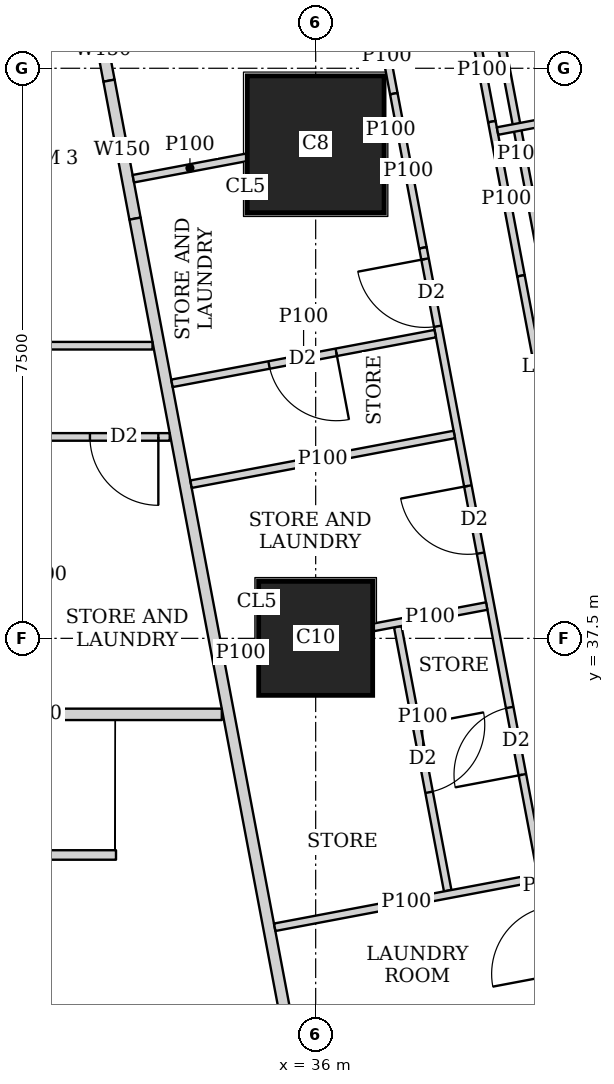
"""IFC4 building model, lengths in metres.
Left out: names, types, materials, properties, quantities, classifications, styles, units other than length and angle.
Written with IfcOpenShell. Run it as: python <this file> out.ifc"""

import sys

from ifc_helpers import new_model, si_unit, direction, frame, frame_2d, origin, origin_2d, place, context, subcontext, project, spatial, rectangle, extrude, element, fill, save


model = new_model("IFC4")
c1 = context("Model", 3, precision=1e-05, world=origin(), true_north=direction((0.0, 1.0)))
c2 = subcontext(c1, "Body", "Model", "MODEL_VIEW")
j1 = project(units=[si_unit("LENGTHUNIT", "METRE"), si_unit("PLANEANGLEUNIT", "RADIAN")], contexts=[c1])
p1 = place(None, origin())
s1 = spatial("IfcSite", under=j1, at=p1, CompositionType="ELEMENT")
p2 = place(p1, origin())
s2 = spatial("IfcBuilding", under=s1, at=p2, CompositionType="ELEMENT")
p3 = place(p2, frame((0.0, 0.0, 135.8)))
s3 = spatial("IfcBuildingStorey", under=s2, at=p3, CompositionType="ELEMENT", Elevation=135.8)
p4 = place(p3, frame((36.0, 37.5, 0.0), z_axis=(0.0, 0.0, 1.0), x_axis=(1.0, 0.0, 0.0)))
e1 = element("IfcColumn", 1, at=p4, inside=s3, PredefinedType="COLUMN", context=c2, shape_type="SweptSolid", body=[
    extrude(rectangle(XDim=1.5, YDim=1.5, at=origin_2d()), origin(), (0.0, 0.0, 1.0), 3.75),
])
p5 = place(p3, frame((36.0, 44.0, 0.0), z_axis=(0.0, 0.0, 1.0), x_axis=(1.0, 0.0, 0.0)))
e2 = element("IfcColumn", 2, at=p5, inside=s3, PredefinedType="COLUMN", context=c2, shape_type="SweptSolid", body=[
    extrude(rectangle(XDim=1.8, YDim=1.8, at=origin_2d()), origin(), (0.0, 0.0, 1.0), 3.75),
])
p6 = place(p3, frame((29.801, 36.5, 0.0), z_axis=(0.0, 0.0, 1.0), x_axis=(1.0, 0.0, 0.0)))
e3 = element("IfcWall", 3, at=p6, inside=s3, PredefinedType="SOLIDWALL", context=c2, shape_type="SweptSolid", body=[
    extrude(rectangle(XDim=4.964, YDim=0.15, at=frame_2d((2.482, 0.0))), origin(), (0.0, 0.0, 1.0), 3.5),
])
p7 = place(p3, frame((33.127, 45.65, 0.0), z_axis=(0.0, 0.0, 1.0), x_axis=(0.186176514576, -0.982516313056, 0.0)))
e4 = element("IfcWall", 4, at=p7, inside=s3, PredefinedType="SOLIDWALL", context=c2, shape_type="SweptSolid", body=[
    extrude(rectangle(XDim=0.827, YDim=0.15, at=frame_2d((0.414, 0.0))), origin(), (0.0, 0.0, 1.0), 3.5),
])
p8 = place(p3, frame((33.281, 44.837, 0.0), z_axis=(0.0, 0.0, 1.0), x_axis=(0.185198323004, -0.982701165745, 0.0)))
e5 = element("IfcWall", 5, at=p8, inside=s3, PredefinedType="SOLIDWALL", context=c2, shape_type="SweptSolid", body=[
    extrude(rectangle(XDim=1.847, YDim=0.15, at=frame_2d((0.923, 0.0))), origin(), (0.0, 0.0, 1.0), 2.1),
])
p9 = place(p3, frame((33.623, 43.022, 0.0), z_axis=(0.0, 0.0, 1.0), x_axis=(0.185596841028, -0.98262597798, 0.0)))
e6 = element("IfcWall", 6, at=p9, inside=s3, PredefinedType="SOLIDWALL", context=c2, shape_type="SweptSolid", body=[
    extrude(rectangle(XDim=41.66, YDim=0.15, at=frame_2d((20.83, 0.0))), origin(), (0.0, 0.0, 1.0), 2.5),
])
p10 = place(p9, frame((20.242, 0.0, 0.0)))
e7 = element("IfcOpeningElement", 7, at=p10, cuts=e6, PredefinedType="OPENING", context=c2, shape_type="SweptSolid", body=[
    extrude(rectangle(XDim=1.0, YDim=2.1, at=frame_2d((0.5, 1.05))), frame((0.0, 0.085, 0.0), z_axis=(0.0, -1.0, 0.0), x_axis=(1.0, 0.0, 0.0)), (0.0, 0.0, 1.0), 0.17),
])
p11 = place(p9, frame((24.714, 0.0, 0.0)))
e8 = element("IfcOpeningElement", 8, at=p11, cuts=e6, PredefinedType="OPENING", context=c2, shape_type="SweptSolid", body=[
    extrude(rectangle(XDim=1.0, YDim=2.1, at=frame_2d((0.5, 1.05))), frame((0.0, 0.085, 0.0), z_axis=(0.0, -1.0, 0.0), x_axis=(1.0, 0.0, 0.0)), (0.0, 0.0, 1.0), 0.17),
])
p12 = place(p9, frame((31.206, 0.0, 0.0)))
e9 = element("IfcOpeningElement", 9, at=p12, cuts=e6, PredefinedType="OPENING", context=c2, shape_type="SweptSolid", body=[
    extrude(rectangle(XDim=1.0, YDim=2.1, at=frame_2d((0.5, 1.05))), frame((0.0, 0.085, 0.0), z_axis=(0.0, -1.0, 0.0), x_axis=(1.0, 0.0, 0.0)), (0.0, 0.0, 1.0), 0.17),
])
p13 = place(p3, frame((39.054, 42.085, 0.0), z_axis=(0.0, 0.0, 1.0), x_axis=(-0.185791584218, 0.982589175207, 0.0)))
e10 = element("IfcWall", 10, at=p13, inside=s3, PredefinedType="PARTITIONING", context=c2, shape_type="SweptSolid", body=[
    extrude(rectangle(XDim=3.628, YDim=0.1, at=frame_2d((1.814, 0.0))), origin(), (0.0, 0.0, 1.0), 2.1),
])
p14 = place(p3, frame((38.063, 45.65, 0.0), z_axis=(0.0, 0.0, 1.0), x_axis=(0.185456359766, -0.982652501458, 0.0)))
e11 = element("IfcWall", 11, at=p14, inside=s3, PredefinedType="PARTITIONING", context=c2, shape_type="SweptSolid", body=[
    extrude(rectangle(XDim=1.376, YDim=0.1, at=frame_2d((0.688, 0.0))), origin(), (0.0, 0.0, 1.0), 3.5),
])
p15 = place(p3, frame((38.318, 44.298, 0.0), z_axis=(0.0, 0.0, 1.0), x_axis=(0.185481135188, -0.982647825261, 0.0)))
e12 = element("IfcWall", 12, at=p15, inside=s3, PredefinedType="PARTITIONING", context=c2, shape_type="SweptSolid", body=[
    extrude(rectangle(XDim=2.064, YDim=0.1, at=frame_2d((1.032, 0.0))), origin(), (0.0, 0.0, 1.0), 2.1),
])
p16 = place(p3, frame((38.701, 42.27, 0.0), z_axis=(0.0, 0.0, 1.0), x_axis=(0.185640619081, -0.98261770824, 0.0)))
e13 = element("IfcWall", 13, at=p16, inside=s3, PredefinedType="PARTITIONING", context=c2, shape_type="SweptSolid", body=[
    extrude(rectangle(XDim=17.103, YDim=0.1, at=frame_2d((8.552, 0.0))), origin(), (0.0, 0.0, 1.0), 2.5),
])
p17 = place(p16, frame((16.053, 0.0, 0.0)))
e14 = element("IfcOpeningElement", 14, at=p17, cuts=e13, PredefinedType="OPENING", context=c2, shape_type="SweptSolid", body=[
    extrude(rectangle(XDim=0.9, YDim=2.1, at=frame_2d((0.45, 1.05))), frame((0.0, 0.06, 0.0), z_axis=(0.0, -1.0, 0.0), x_axis=(1.0, 0.0, 0.0)), (0.0, 0.0, 1.0), 0.12),
])
p18 = place(p16, frame((12.077, 0.0, 0.0)))
e15 = element("IfcOpeningElement", 15, at=p18, cuts=e13, PredefinedType="OPENING", context=c2, shape_type="SweptSolid", body=[
    extrude(rectangle(XDim=0.9, YDim=2.1, at=frame_2d((0.45, 1.05))), frame((0.0, 0.06, 0.0), z_axis=(0.0, -1.0, 0.0), x_axis=(1.0, 0.0, 0.0)), (0.0, 0.0, 1.0), 0.12),
])
p19 = place(p16, frame((8.42, 0.0, 0.0)))
e16 = element("IfcOpeningElement", 16, at=p19, cuts=e13, PredefinedType="OPENING", context=c2, shape_type="SweptSolid", body=[
    extrude(rectangle(XDim=0.9, YDim=2.1, at=frame_2d((0.45, 1.05))), frame((0.0, 0.06, 0.0), z_axis=(0.0, -1.0, 0.0), x_axis=(1.0, 0.0, 0.0)), (0.0, 0.0, 1.0), 0.12),
])
p20 = place(p16, frame((4.444, 0.0, 0.0)))
e17 = element("IfcOpeningElement", 17, at=p20, cuts=e13, PredefinedType="OPENING", context=c2, shape_type="SweptSolid", body=[
    extrude(rectangle(XDim=0.9, YDim=2.1, at=frame_2d((0.45, 1.05))), frame((0.0, 0.06, 0.0), z_axis=(0.0, -1.0, 0.0), x_axis=(1.0, 0.0, 0.0)), (0.0, 0.0, 1.0), 0.12),
])
p21 = place(p3, frame((36.842, 45.65, 0.0), z_axis=(0.0, 0.0, 1.0), x_axis=(0.185789875365, -0.982589498322, 0.0)))
e18 = element("IfcWall", 18, at=p21, inside=s3, PredefinedType="PARTITIONING", context=c2, shape_type="SweptSolid", body=[
    extrude(rectangle(XDim=1.001, YDim=0.1, at=frame_2d((0.5, 0.0))), origin(), (0.0, 0.0, 1.0), 3.5),
])
p22 = place(p3, frame((37.028, 44.666, 0.0), z_axis=(0.0, 0.0, 1.0), x_axis=(0.185481135188, -0.982647825261, 0.0)))
e19 = element("IfcWall", 19, at=p22, inside=s3, PredefinedType="PARTITIONING", context=c2, shape_type="SweptSolid", body=[
    extrude(rectangle(XDim=2.064, YDim=0.1, at=frame_2d((1.032, 0.0))), origin(), (0.0, 0.0, 1.0), 2.1),
])
p23 = place(p3, frame((37.411, 42.638, 0.0), z_axis=(0.0, 0.0, 1.0), x_axis=(0.185555586706, -0.982633769134, 0.0)))
e20 = element("IfcWall", 20, at=p23, inside=s3, PredefinedType="PARTITIONING", context=c2, shape_type="SweptSolid", body=[
    extrude(rectangle(XDim=17.704, YDim=0.1, at=frame_2d((8.852, 0.0))), origin(), (0.0, 0.0, 1.0), 2.5),
])
p24 = place(p23, frame((16.28, 0.0, 0.0)))
e21 = element("IfcOpeningElement", 21, at=p24, cuts=e20, PredefinedType="OPENING", context=c2, shape_type="SweptSolid", body=[
    extrude(rectangle(XDim=0.9, YDim=2.1, at=frame_2d((0.45, 1.05))), frame((0.0, 0.06, 0.0), z_axis=(0.0, -1.0, 0.0), x_axis=(1.0, 0.0, 0.0)), (0.0, 0.0, 1.0), 0.12),
])
p25 = place(p23, frame((12.688, 0.0, 0.0)))
e22 = element("IfcOpeningElement", 22, at=p25, cuts=e20, PredefinedType="OPENING", context=c2, shape_type="SweptSolid", body=[
    extrude(rectangle(XDim=0.9, YDim=2.1, at=frame_2d((0.45, 1.05))), frame((0.0, 0.06, 0.0), z_axis=(0.0, -1.0, 0.0), x_axis=(1.0, 0.0, 0.0)), (0.0, 0.0, 1.0), 0.12),
])
p26 = place(p23, frame((8.822, 0.0, 0.0)))
e23 = element("IfcOpeningElement", 23, at=p26, cuts=e20, PredefinedType="OPENING", context=c2, shape_type="SweptSolid", body=[
    extrude(rectangle(XDim=0.9, YDim=2.1, at=frame_2d((0.45, 1.05))), frame((0.0, 0.06, 0.0), z_axis=(0.0, -1.0, 0.0), x_axis=(1.0, 0.0, 0.0)), (0.0, 0.0, 1.0), 0.12),
])
p27 = place(p23, frame((3.188, 0.0, 0.0)))
e24 = element("IfcOpeningElement", 24, at=p27, cuts=e20, PredefinedType="OPENING", context=c2, shape_type="SweptSolid", body=[
    extrude(rectangle(XDim=0.9, YDim=2.1, at=frame_2d((0.45, 1.05))), frame((0.0, 0.06, 0.0), z_axis=(0.0, -1.0, 0.0), x_axis=(1.0, 0.0, 0.0)), (0.0, 0.0, 1.0), 0.12),
])
p28 = place(p23, frame((0.15, 0.0, 0.0)))
e25 = element("IfcOpeningElement", 25, at=p28, cuts=e20, PredefinedType="OPENING", context=c2, shape_type="SweptSolid", body=[
    extrude(rectangle(XDim=0.9, YDim=2.1, at=frame_2d((0.45, 1.05))), frame((0.0, 0.06, 0.0), z_axis=(0.0, -1.0, 0.0), x_axis=(1.0, 0.0, 0.0)), (0.0, 0.0, 1.0), 0.12),
])
p29 = place(p23, frame((14.371, 0.0, 0.0)))
e26 = element("IfcOpeningElement", 26, at=p29, cuts=e20, PredefinedType="OPENING", context=c2, shape_type="SweptSolid", body=[
    extrude(rectangle(XDim=0.9, YDim=2.1, at=frame_2d((0.45, 1.05))), frame((0.0, 0.06, 0.0), z_axis=(0.0, -1.0, 0.0), x_axis=(1.0, 0.0, 0.0)), (0.0, 0.0, 1.0), 0.12),
])
p30 = place(p23, frame((10.78, 0.0, 0.0)))
e27 = element("IfcOpeningElement", 27, at=p30, cuts=e20, PredefinedType="OPENING", context=c2, shape_type="SweptSolid", body=[
    extrude(rectangle(XDim=0.9, YDim=2.1, at=frame_2d((0.45, 1.05))), frame((0.0, 0.06, 0.0), z_axis=(0.0, -1.0, 0.0), x_axis=(1.0, 0.0, 0.0)), (0.0, 0.0, 1.0), 0.12),
])
p31 = place(p23, frame((6.154, 0.0, 0.0)))
e28 = element("IfcOpeningElement", 28, at=p31, cuts=e20, PredefinedType="OPENING", context=c2, shape_type="SweptSolid", body=[
    extrude(rectangle(XDim=0.9, YDim=2.1, at=frame_2d((0.45, 1.05))), frame((0.0, 0.06, 0.0), z_axis=(0.0, -1.0, 0.0), x_axis=(1.0, 0.0, 0.0)), (0.0, 0.0, 1.0), 0.12),
])
p32 = place(p3, frame((41.968, 44.85, 0.0), z_axis=(0.0, 0.0, 1.0), x_axis=(-0.98258614234, -0.185807623311, 0.0)))
e29 = element("IfcWall", 29, at=p32, inside=s3, PredefinedType="PARTITIONING", context=c2, shape_type="SweptSolid", body=[
    extrude(rectangle(XDim=3.638, YDim=0.1, at=frame_2d((1.819, 0.0))), origin(), (0.0, 0.0, 1.0), 2.1),
])
p33 = place(p3, frame((37.065, 44.201, 0.0), z_axis=(0.0, 0.0, 1.0), x_axis=(-0.983168876381, -0.182699098288, 0.0)))
e30 = element("IfcWall", 30, at=p33, inside=s3, PredefinedType="PARTITIONING", context=c2, shape_type="SweptSolid", body=[
    extrude(rectangle(XDim=0.158, YDim=0.1, at=frame_2d((0.079, 0.0))), origin(), (0.0, 0.0, 1.0), 2.1),
])
p34 = place(p3, frame((35.09, 43.828, 0.0), z_axis=(0.0, 0.0, 1.0), x_axis=(-0.982683801717, -0.185290436461, 0.0)))
e31 = element("IfcWall", 31, at=p34, inside=s3, PredefinedType="PARTITIONING", context=c2, shape_type="SweptSolid", body=[
    extrude(rectangle(XDim=1.515, YDim=0.1, at=frame_2d((0.758, 0.0))), origin(), (0.0, 0.0, 1.0), 2.1),
])
p35 = place(p3, frame((37.824, 40.182, 0.0), z_axis=(0.0, 0.0, 1.0), x_axis=(-0.982648794755, -0.185475998897, 0.0)))
e32 = element("IfcWall", 32, at=p35, inside=s3, PredefinedType="PARTITIONING", context=c2, shape_type="SweptSolid", body=[
    extrude(rectangle(XDim=3.525, YDim=0.1, at=frame_2d((1.763, 0.0))), origin(), (0.0, 0.0, 1.0), 3.5),
])
p36 = place(p3, frame((38.25, 37.925, 0.0), z_axis=(0.0, 0.0, 1.0), x_axis=(-0.982676595259, -0.18532865167, 0.0)))
e33 = element("IfcWall", 33, at=p36, inside=s3, PredefinedType="PARTITIONING", context=c2, shape_type="SweptSolid", body=[
    extrude(rectangle(XDim=1.516, YDim=0.1, at=frame_2d((0.758, 0.0))), origin(), (0.0, 0.0, 1.0), 3.5),
])
p37 = place(p3, frame((35.24, 37.357, 0.0), z_axis=(0.0, 0.0, 1.0), x_axis=(-0.982559813104, -0.18594680334, 0.0)))
e34 = element("IfcWall", 34, at=p37, inside=s3, PredefinedType="PARTITIONING", context=c2, shape_type="SweptSolid", body=[
    extrude(rectangle(XDim=0.462, YDim=0.1, at=frame_2d((0.231, 0.0))), origin(), (0.0, 0.0, 1.0), 3.5),
])
p38 = place(p3, frame((39.24, 32.683, 0.0), z_axis=(0.0, 0.0, 1.0), x_axis=(-0.982638553676, -0.185530247748, 0.0)))
e35 = element("IfcWall", 35, at=p38, inside=s3, PredefinedType="PARTITIONING", context=c2, shape_type="SweptSolid", body=[
    extrude(rectangle(XDim=3.525, YDim=0.1, at=frame_2d((1.763, 0.0))), origin(), (0.0, 0.0, 1.0), 3.5),
])
p39 = place(p3, frame((38.924, 34.353, 0.0), z_axis=(0.0, 0.0, 1.0), x_axis=(-0.982629014545, -0.18558076348, 0.0)))
e36 = element("IfcWall", 36, at=p39, inside=s3, PredefinedType="PARTITIONING", context=c2, shape_type="SweptSolid", body=[
    extrude(rectangle(XDim=3.524, YDim=0.1, at=frame_2d((1.762, 0.0))), origin(), (0.0, 0.0, 1.0), 3.5),
])
p40 = place(p3, frame((21.6, 41.35, 0.0), z_axis=(0.0, 0.0, 1.0), x_axis=(1.0, 0.0, 0.0)))
e37 = element("IfcWall", 37, at=p40, inside=s3, PredefinedType="PARTITIONING", context=c2, shape_type="SweptSolid", body=[
    extrude(rectangle(XDim=12.253, YDim=0.1, at=frame_2d((6.126, 0.0))), origin(), (0.0, 0.0, 1.0), 3.5),
])
p41 = place(p40, frame((0.2, 0.0, 0.0)))
e38 = element("IfcOpeningElement", 38, at=p41, cuts=e37, PredefinedType="OPENING", context=c2, shape_type="SweptSolid", body=[
    extrude(rectangle(XDim=0.9, YDim=2.1, at=frame_2d((0.45, 1.05))), frame((0.0, 0.06, 0.0), z_axis=(0.0, -1.0, 0.0), x_axis=(1.0, 0.0, 0.0)), (0.0, 0.0, 1.0), 0.12),
])
p42 = place(p40, frame((3.8, 0.0, 0.0)))
e39 = element("IfcOpeningElement", 39, at=p42, cuts=e37, PredefinedType="OPENING", context=c2, shape_type="SweptSolid", body=[
    extrude(rectangle(XDim=0.9, YDim=2.1, at=frame_2d((0.45, 1.05))), frame((0.0, 0.06, 0.0), z_axis=(0.0, -1.0, 0.0), x_axis=(1.0, 0.0, 0.0)), (0.0, 0.0, 1.0), 0.12),
])
p43 = place(p40, frame((7.4, 0.0, 0.0)))
e40 = element("IfcOpeningElement", 40, at=p43, cuts=e37, PredefinedType="OPENING", context=c2, shape_type="SweptSolid", body=[
    extrude(rectangle(XDim=0.9, YDim=2.1, at=frame_2d((0.45, 1.05))), frame((0.0, 0.06, 0.0), z_axis=(0.0, -1.0, 0.0), x_axis=(1.0, 0.0, 0.0)), (0.0, 0.0, 1.0), 0.12),
])
p44 = place(p3, frame((21.6, 40.15, 0.0), z_axis=(0.0, 0.0, 1.0), x_axis=(1.0, 0.0, 0.0)))
e41 = element("IfcWall", 41, at=p44, inside=s3, PredefinedType="PARTITIONING", context=c2, shape_type="SweptSolid", body=[
    extrude(rectangle(XDim=12.48, YDim=0.1, at=frame_2d((6.24, 0.0))), origin(), (0.0, 0.0, 1.0), 3.5),
])
p45 = place(p44, frame((0.575, 0.0, 0.0)))
e42 = element("IfcOpeningElement", 42, at=p45, cuts=e41, PredefinedType="OPENING", context=c2, shape_type="SweptSolid", body=[
    extrude(rectangle(XDim=0.9, YDim=2.1, at=frame_2d((0.45, 1.05))), frame((0.0, 0.06, 0.0), z_axis=(0.0, -1.0, 0.0), x_axis=(1.0, 0.0, 0.0)), (0.0, 0.0, 1.0), 0.12),
])
p46 = place(p44, frame((3.95, 0.0, 0.0)))
e43 = element("IfcOpeningElement", 43, at=p46, cuts=e41, PredefinedType="OPENING", context=c2, shape_type="SweptSolid", body=[
    extrude(rectangle(XDim=0.9, YDim=2.1, at=frame_2d((0.45, 1.05))), frame((0.0, 0.06, 0.0), z_axis=(0.0, -1.0, 0.0), x_axis=(1.0, 0.0, 0.0)), (0.0, 0.0, 1.0), 0.12),
])
p47 = place(p44, frame((7.6, 0.0, 0.0)))
e44 = element("IfcOpeningElement", 44, at=p47, cuts=e41, PredefinedType="OPENING", context=c2, shape_type="SweptSolid", body=[
    extrude(rectangle(XDim=0.9, YDim=2.1, at=frame_2d((0.45, 1.05))), frame((0.0, 0.06, 0.0), z_axis=(0.0, -1.0, 0.0), x_axis=(1.0, 0.0, 0.0)), (0.0, 0.0, 1.0), 0.12),
])
p48 = place(p44, frame((11.43, 0.0, 0.0)))
e45 = element("IfcOpeningElement", 45, at=p48, cuts=e41, PredefinedType="OPENING", context=c2, shape_type="SweptSolid", body=[
    extrude(rectangle(XDim=0.9, YDim=2.1, at=frame_2d((0.45, 1.05))), frame((0.0, 0.06, 0.0), z_axis=(0.0, -1.0, 0.0), x_axis=(1.0, 0.0, 0.0)), (0.0, 0.0, 1.0), 0.12),
])
p49 = place(p44, frame((2.375, 0.0, 0.0)))
e46 = element("IfcOpeningElement", 46, at=p49, cuts=e41, PredefinedType="OPENING", context=c2, shape_type="SweptSolid", body=[
    extrude(rectangle(XDim=0.9, YDim=2.1, at=frame_2d((0.45, 1.05))), frame((0.0, 0.06, 0.0), z_axis=(0.0, -1.0, 0.0), x_axis=(1.0, 0.0, 0.0)), (0.0, 0.0, 1.0), 0.12),
])
p50 = place(p44, frame((5.75, 0.0, 0.0)))
e47 = element("IfcOpeningElement", 47, at=p50, cuts=e41, PredefinedType="OPENING", context=c2, shape_type="SweptSolid", body=[
    extrude(rectangle(XDim=0.9, YDim=2.1, at=frame_2d((0.45, 1.05))), frame((0.0, 0.06, 0.0), z_axis=(0.0, -1.0, 0.0), x_axis=(1.0, 0.0, 0.0)), (0.0, 0.0, 1.0), 0.12),
])
p51 = place(p44, frame((9.4, 0.0, 0.0)))
e48 = element("IfcOpeningElement", 48, at=p51, cuts=e41, PredefinedType="OPENING", context=c2, shape_type="SweptSolid", body=[
    extrude(rectangle(XDim=0.9, YDim=2.1, at=frame_2d((0.45, 1.05))), frame((0.0, 0.06, 0.0), z_axis=(0.0, -1.0, 0.0), x_axis=(1.0, 0.0, 0.0)), (0.0, 0.0, 1.0), 0.12),
])
p52 = place(p3, frame((37.08, 37.653, 0.0), z_axis=(0.0, 0.0, 1.0), x_axis=(0.185864634688, -0.982575359742, 0.0)))
e49 = element("IfcWall", 49, at=p52, inside=s3, PredefinedType="PARTITIONING", context=c2, shape_type="SweptSolid", body=[
    extrude(rectangle(XDim=3.535, YDim=0.1, at=frame_2d((1.767, 0.0))), origin(), (0.0, 0.0, 1.0), 3.5),
])
p53 = place(p52, frame((1.317, 0.0, 0.0)))
e50 = element("IfcOpeningElement", 50, at=p53, cuts=e49, PredefinedType="OPENING", context=c2, shape_type="SweptSolid", body=[
    extrude(rectangle(XDim=0.9, YDim=2.1, at=frame_2d((0.45, 1.05))), frame((0.0, 0.06, 0.0), z_axis=(0.0, -1.0, 0.0), x_axis=(1.0, 0.0, 0.0)), (0.0, 0.0, 1.0), 0.12),
])
p54 = place(p3, frame((37.573, 41.509, 0.0), z_axis=(0.0, 0.0, 1.0), x_axis=(-0.982638553676, -0.185530247748, 0.0)))
e51 = element("IfcWall", 51, at=p54, inside=s3, PredefinedType="PARTITIONING", context=c2, shape_type="SweptSolid", body=[
    extrude(rectangle(XDim=3.525, YDim=0.1, at=frame_2d((1.763, 0.0))), origin(), (0.0, 0.0, 1.0), 3.5),
])
p55 = place(p54, frame((1.325, 0.0, 0.0)))
e52 = element("IfcOpeningElement", 52, at=p55, cuts=e51, PredefinedType="OPENING", context=c2, shape_type="SweptSolid", body=[
    extrude(rectangle(XDim=0.9, YDim=2.1, at=frame_2d((0.45, 1.05))), frame((0.0, 0.06, 0.0), z_axis=(0.0, -1.0, 0.0), x_axis=(1.0, 0.0, 0.0)), (0.0, 0.0, 1.0), 0.12),
])
p56 = place(p3, frame((28.95, 34.65, 0.0), z_axis=(0.0, 0.0, 1.0), x_axis=(1.0, 0.0, 0.0)))
e53 = element("IfcWall", 53, at=p56, inside=s3, PredefinedType="PARTITIONING", context=c2, shape_type="SweptSolid", body=[
    extrude(rectangle(XDim=4.423, YDim=0.125, at=frame_2d((2.211, 0.0))), origin(), (0.0, 0.0, 1.0), 3.5),
])
p57 = place(p3, frame((32.929, 23.263, 0.0), z_axis=(0.0, 0.0, 1.0), x_axis=(-0.185612234763, 0.982623070311, 0.0)))
e54 = element("IfcWall", 54, at=p57, inside=s3, PredefinedType="PARTITIONING", context=c2, shape_type="SweptSolid", body=[
    extrude(rectangle(XDim=11.513, YDim=0.125, at=frame_2d((5.756, 0.0))), origin(), (0.0, 0.0, 1.0), 3.5),
])
p58 = place(p57, frame((0.15, 0.0, 0.0)))
e55 = element("IfcOpeningElement", 55, at=p58, cuts=e54, PredefinedType="OPENING", context=c2, shape_type="SweptSolid", body=[
    extrude(rectangle(XDim=1.0, YDim=2.1, at=frame_2d((0.5, 1.05))), frame((0.0, 0.073, 0.0), z_axis=(0.0, -1.0, 0.0), x_axis=(1.0, 0.0, 0.0)), (0.0, 0.0, 1.0), 0.145),
])
p59 = place(p57, frame((7.679, 0.0, 0.0)))
e56 = element("IfcOpeningElement", 56, at=p59, cuts=e54, PredefinedType="OPENING", context=c2, shape_type="SweptSolid", body=[
    extrude(rectangle(XDim=1.0, YDim=2.1, at=frame_2d((0.5, 1.05))), frame((0.0, 0.073, 0.0), z_axis=(0.0, -1.0, 0.0), x_axis=(1.0, 0.0, 0.0)), (0.0, 0.0, 1.0), 0.145),
])
p60 = place(p27, origin())
e57 = element("IfcDoor", 57, at=p60, inside=s3, OperationType="SINGLE_SWING_RIGHT", PredefinedType="DOOR", context=c2, shape_type="SweptSolid", body=[
    extrude(rectangle(XDim=0.9, YDim=2.1, at=frame_2d((0.45, 1.05))), frame((0.0, 0.025, 0.0), z_axis=(0.0, -1.0, 0.0), x_axis=(1.0, 0.0, 0.0)), (0.0, 0.0, 1.0), 0.05),
])
fill(e24, e57)
p61 = place(p28, origin())
e58 = element("IfcDoor", 58, at=p61, inside=s3, OperationType="SINGLE_SWING_RIGHT", PredefinedType="DOOR", context=c2, shape_type="SweptSolid", body=[
    extrude(rectangle(XDim=0.9, YDim=2.1, at=frame_2d((0.45, 1.05))), frame((0.0, 0.025, 0.0), z_axis=(0.0, -1.0, 0.0), x_axis=(1.0, 0.0, 0.0)), (0.0, 0.0, 1.0), 0.05),
])
fill(e25, e58)
p62 = place(p31, origin())
e59 = element("IfcDoor", 59, at=p62, inside=s3, OperationType="SINGLE_SWING_LEFT", PredefinedType="DOOR", context=c2, shape_type="SweptSolid", body=[
    extrude(rectangle(XDim=0.9, YDim=2.1, at=frame_2d((0.45, 1.05))), frame((0.0, 0.025, 0.0), z_axis=(0.0, -1.0, 0.0), x_axis=(1.0, 0.0, 0.0)), (0.0, 0.0, 1.0), 0.05),
])
fill(e28, e59)
p63 = place(p48, origin())
e60 = element("IfcDoor", 60, at=p63, inside=s3, OperationType="SINGLE_SWING_LEFT", PredefinedType="DOOR", context=c2, shape_type="SweptSolid", body=[
    extrude(rectangle(XDim=0.9, YDim=2.1, at=frame_2d((0.45, 1.05))), frame((0.0, 0.025, 0.0), z_axis=(0.0, -1.0, 0.0), x_axis=(1.0, 0.0, 0.0)), (0.0, 0.0, 1.0), 0.05),
])
fill(e45, e60)
p64 = place(p53, origin())
e61 = element("IfcDoor", 61, at=p64, inside=s3, OperationType="SINGLE_SWING_LEFT", PredefinedType="DOOR", context=c2, shape_type="SweptSolid", body=[
    extrude(rectangle(XDim=0.9, YDim=2.1, at=frame_2d((0.45, 1.05))), frame((0.0, 0.025, 0.0), z_axis=(0.0, -1.0, 0.0), x_axis=(1.0, 0.0, 0.0)), (0.0, 0.0, 1.0), 0.05),
])
fill(e50, e61)
p65 = place(p55, origin())
e62 = element("IfcDoor", 62, at=p65, inside=s3, OperationType="SINGLE_SWING_LEFT", PredefinedType="DOOR", context=c2, shape_type="SweptSolid", body=[
    extrude(rectangle(XDim=0.9, YDim=2.1, at=frame_2d((0.45, 1.05))), frame((0.0, 0.025, 0.0), z_axis=(0.0, -1.0, 0.0), x_axis=(1.0, 0.0, 0.0)), (0.0, 0.0, 1.0), 0.05),
])
fill(e52, e62)
save(model, sys.argv[1])
